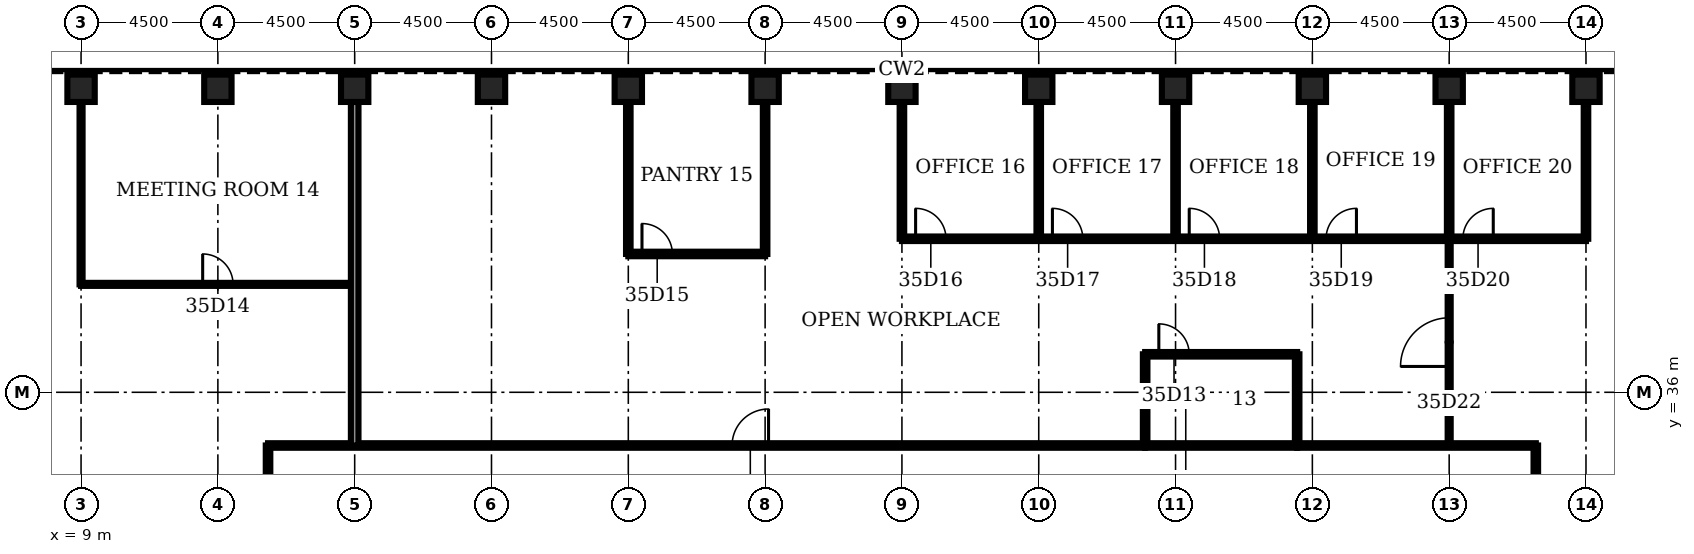
"""IFC4 building model, lengths in metres.
Left out: names, types, materials, properties, quantities, classifications, styles, units other than length and angle.
Written with IfcOpenShell. Run it as: python <this file> out.ifc"""

import sys

from ifc_helpers import new_model, si_unit, direction, frame, frame_2d, origin, origin_2d, place, context, subcontext, project, spatial, rectangle, hollow_rectangle, extrude, element, fill, save


model = new_model("IFC4")
c1 = context("Model", 3, precision=1e-05, world=origin(), true_north=direction((0.0, 1.0)))
c2 = subcontext(c1, "Body", "Model", "MODEL_VIEW")
j1 = project(units=[si_unit("LENGTHUNIT", "METRE"), si_unit("PLANEANGLEUNIT", "RADIAN")], contexts=[c1])
p1 = place(None, origin())
s1 = spatial("IfcSite", under=j1, at=p1, CompositionType="ELEMENT")
p2 = place(p1, origin())
s2 = spatial("IfcBuilding", under=s1, at=p2, CompositionType="ELEMENT")
p3 = place(p2, frame((0.0, 0.0, 159.3)))
s3 = spatial("IfcBuildingStorey", under=s2, at=p3, CompositionType="ELEMENT", Elevation=159.3)
for number, where, z_axis, x_axis in (
    (1, (58.5, 46.0, 0.0), (0.0, 0.0, 1.0), (0.0, 1.0, 0.0)),
    (2, (54.0, 46.0, 0.0), (0.0, 0.0, 1.0), (0.0, 1.0, 0.0)),
    (3, (49.5, 46.0, 0.0), (0.0, 0.0, 1.0), (0.0, 1.0, 0.0)),
    (4, (45.0, 46.0, 0.0), (0.0, 0.0, 1.0), (0.0, 1.0, 0.0)),
    (5, (40.5, 46.0, 0.0), (0.0, 0.0, 1.0), (0.0, 1.0, 0.0)),
    (6, (36.0, 46.0, 0.0), (0.0, 0.0, 1.0), (0.0, 1.0, 0.0)),
    (7, (31.5, 46.0, 0.0), (0.0, 0.0, 1.0), (0.0, 1.0, 0.0)),
    (8, (27.0, 46.0, 0.0), (0.0, 0.0, 1.0), (0.0, 1.0, 0.0)),
    (9, (22.5, 46.0, 0.0), (0.0, 0.0, 1.0), (0.0, 1.0, 0.0)),
    (10, (18.0, 46.0, 0.0), (0.0, 0.0, 1.0), (0.0, 1.0, 0.0)),
    (11, (13.5, 46.0, 0.0), (0.0, 0.0, 1.0), (0.0, 1.0, 0.0)),
    (12, (9.0, 46.0, 0.0), (0.0, 0.0, 1.0), (0.0, 1.0, 0.0)),
):
    element("IfcColumn", number, at=place(p3, frame(where, z_axis=z_axis, x_axis=x_axis)), inside=s3, PredefinedType="COLUMN", context=c2, shape_type="SweptSolid", body=[
        extrude(hollow_rectangle(XDim=0.9, YDim=0.9, WallThickness=0.1, at=origin_2d()), origin(), (0.0, 0.0, 1.0), 4.2),
    ])
p4 = place(p3, frame((15.15, 34.25, 0.0), z_axis=(0.0, 0.0, 1.0), x_axis=(1.0, 0.0, 0.0)))
e13 = element("IfcWall", 13, at=p4, inside=s3, PredefinedType="PARTITIONING", context=c2, shape_type="SweptSolid", body=[
    extrude(rectangle(XDim=28.85, YDim=0.15, at=frame_2d((14.425, 0.0))), origin(), (0.0, 0.0, 1.0), 3.0),
])
p5 = place(p4, frame((15.263, 0.0, 0.0)))
e14 = element("IfcOpeningElement", 14, at=p5, cuts=e13, PredefinedType="OPENING", context=c2, shape_type="SweptSolid", body=[
    extrude(rectangle(XDim=1.2, YDim=2.1, at=frame_2d((0.6, 1.05))), frame((0.0, 0.085, 0.0), z_axis=(0.0, -1.0, 0.0), x_axis=(1.0, 0.0, 0.0)), (0.0, 0.0, 1.0), 0.17),
])
p6 = place(p3, frame((44.0, 34.25, 0.0), z_axis=(0.0, 0.0, 1.0), x_axis=(1.0, 0.0, 0.0)))
e15 = element("IfcWall", 15, at=p6, inside=s3, PredefinedType="PARTITIONING", context=c2, shape_type="SweptSolid", body=[
    extrude(rectangle(XDim=5.0, YDim=0.15, at=frame_2d((2.5, 0.0))), origin(), (0.0, 0.0, 1.0), 3.0),
])
p7 = place(p3, frame((49.0, 34.25, 0.0), z_axis=(0.0, 0.0, 1.0), x_axis=(1.0, 0.0, 0.0)))
e16 = element("IfcWall", 16, at=p7, inside=s3, PredefinedType="PARTITIONING", context=c2, shape_type="SweptSolid", body=[
    extrude(rectangle(XDim=7.85, YDim=0.15, at=frame_2d((3.925, 0.0))), origin(), (0.0, 0.0, 1.0), 3.0),
])
p8 = place(p3, frame((44.0, 37.25, 0.0), z_axis=(0.0, 0.0, 1.0), x_axis=(1.0, 0.0, 0.0)))
e17 = element("IfcWall", 17, at=p8, inside=s3, PredefinedType="PARTITIONING", context=c2, shape_type="SweptSolid", body=[
    extrude(rectangle(XDim=5.0, YDim=0.15, at=frame_2d((2.5, 0.0))), origin(), (0.0, 0.0, 1.0), 3.0),
])
p9 = place(p8, frame((0.45, 0.0, 0.0)))
e18 = element("IfcOpeningElement", 18, at=p9, cuts=e17, PredefinedType="OPENING", context=c2, shape_type="SweptSolid", body=[
    extrude(rectangle(XDim=1.0, YDim=2.1, at=frame_2d((0.5, 1.05))), frame((0.0, 0.085, 0.0), z_axis=(0.0, -1.0, 0.0), x_axis=(1.0, 0.0, 0.0)), (0.0, 0.0, 1.0), 0.17),
])
p10 = place(p3, frame((9.0, 39.55, 0.0), z_axis=(0.0, 0.0, 1.0), x_axis=(1.0, 0.0, 0.0)))
e19 = element("IfcWall", 19, at=p10, inside=s3, PredefinedType="PARTITIONING", context=c2, shape_type="SweptSolid", body=[
    extrude(rectangle(XDim=9.0, YDim=0.1, at=frame_2d((4.5, 0.0))), origin(), (0.0, 0.0, 1.0), 3.0),
])
p11 = place(p10, frame((4.0, 0.0, 0.0)))
e20 = element("IfcOpeningElement", 20, at=p11, cuts=e19, PredefinedType="OPENING", context=c2, shape_type="SweptSolid", body=[
    extrude(rectangle(XDim=1.0, YDim=2.1, at=frame_2d((0.5, 1.05))), frame((0.0, 0.06, 0.0), z_axis=(0.0, -1.0, 0.0), x_axis=(1.0, 0.0, 0.0)), (0.0, 0.0, 1.0), 0.12),
])
p12 = place(p3, frame((27.0, 40.55, 0.0), z_axis=(0.0, 0.0, 1.0), x_axis=(1.0, 0.0, 0.0)))
e21 = element("IfcWall", 21, at=p12, inside=s3, PredefinedType="PARTITIONING", context=c2, shape_type="SweptSolid", body=[
    extrude(rectangle(XDim=4.5, YDim=0.15, at=frame_2d((2.25, 0.0))), origin(), (0.0, 0.0, 1.0), 3.0),
])
p13 = place(p12, frame((0.45, 0.0, 0.0)))
e22 = element("IfcOpeningElement", 22, at=p13, cuts=e21, PredefinedType="OPENING", context=c2, shape_type="SweptSolid", body=[
    extrude(rectangle(XDim=1.0, YDim=2.1, at=frame_2d((0.5, 1.05))), frame((0.0, 0.085, 0.0), z_axis=(0.0, -1.0, 0.0), x_axis=(1.0, 0.0, 0.0)), (0.0, 0.0, 1.0), 0.17),
])
p14 = place(p3, frame((36.0, 41.05, 0.0), z_axis=(0.0, 0.0, 1.0), x_axis=(1.0, 0.0, 0.0)))
e23 = element("IfcWall", 23, at=p14, inside=s3, PredefinedType="PARTITIONING", context=c2, shape_type="SweptSolid", body=[
    extrude(rectangle(XDim=22.5, YDim=0.15, at=frame_2d((11.25, 0.0))), origin(), (0.0, 0.0, 1.0), 3.0),
])
p15 = place(p14, frame((0.45, 0.0, 0.0)))
e24 = element("IfcOpeningElement", 24, at=p15, cuts=e23, PredefinedType="OPENING", context=c2, shape_type="SweptSolid", body=[
    extrude(rectangle(XDim=1.0, YDim=2.1, at=frame_2d((0.5, 1.05))), frame((0.0, 0.085, 0.0), z_axis=(0.0, -1.0, 0.0), x_axis=(1.0, 0.0, 0.0)), (0.0, 0.0, 1.0), 0.17),
])
p16 = place(p14, frame((4.95, 0.0, 0.0)))
e25 = element("IfcOpeningElement", 25, at=p16, cuts=e23, PredefinedType="OPENING", context=c2, shape_type="SweptSolid", body=[
    extrude(rectangle(XDim=1.0, YDim=2.1, at=frame_2d((0.5, 1.05))), frame((0.0, 0.085, 0.0), z_axis=(0.0, -1.0, 0.0), x_axis=(1.0, 0.0, 0.0)), (0.0, 0.0, 1.0), 0.17),
])
p17 = place(p14, frame((9.45, 0.0, 0.0)))
e26 = element("IfcOpeningElement", 26, at=p17, cuts=e23, PredefinedType="OPENING", context=c2, shape_type="SweptSolid", body=[
    extrude(rectangle(XDim=1.0, YDim=2.1, at=frame_2d((0.5, 1.05))), frame((0.0, 0.085, 0.0), z_axis=(0.0, -1.0, 0.0), x_axis=(1.0, 0.0, 0.0)), (0.0, 0.0, 1.0), 0.17),
])
p18 = place(p14, frame((13.95, 0.0, 0.0)))
e27 = element("IfcOpeningElement", 27, at=p18, cuts=e23, PredefinedType="OPENING", context=c2, shape_type="SweptSolid", body=[
    extrude(rectangle(XDim=1.0, YDim=2.1, at=frame_2d((0.5, 1.05))), frame((0.0, 0.085, 0.0), z_axis=(0.0, -1.0, 0.0), x_axis=(1.0, 0.0, 0.0)), (0.0, 0.0, 1.0), 0.17),
])
p19 = place(p14, frame((18.45, 0.0, 0.0)))
e28 = element("IfcOpeningElement", 28, at=p19, cuts=e23, PredefinedType="OPENING", context=c2, shape_type="SweptSolid", body=[
    extrude(rectangle(XDim=1.0, YDim=2.1, at=frame_2d((0.5, 1.05))), frame((0.0, 0.085, 0.0), z_axis=(0.0, -1.0, 0.0), x_axis=(1.0, 0.0, 0.0)), (0.0, 0.0, 1.0), 0.17),
])
p20 = place(p3, frame((9.0, 39.55, 0.0), z_axis=(0.0, 0.0, 1.0), x_axis=(0.0, 1.0, 0.0)))
e29 = element("IfcWall", 29, at=p20, inside=s3, PredefinedType="PARTITIONING", context=c2, shape_type="SweptSolid", body=[
    extrude(rectangle(XDim=6.0, YDim=0.1, at=frame_2d((3.0, 0.0))), origin(), (0.0, 0.0, 1.0), 3.0),
])
p21 = place(p3, frame((15.15, 13.75, 0.0), z_axis=(0.0, 0.0, 1.0), x_axis=(0.0, 1.0, 0.0)))
e30 = element("IfcWall", 30, at=p21, inside=s3, PredefinedType="PARTITIONING", context=c2, shape_type="SweptSolid", body=[
    extrude(rectangle(XDim=20.5, YDim=0.15, at=frame_2d((10.25, 0.0))), origin(), (0.0, 0.0, 1.0), 3.0),
])
p22 = place(p21, frame((9.65, 0.0, 0.0)))
e31 = element("IfcOpeningElement", 31, at=p22, cuts=e30, PredefinedType="OPENING", context=c2, shape_type="SweptSolid", body=[
    extrude(rectangle(XDim=1.2, YDim=2.1, at=frame_2d((0.6, 1.05))), frame((0.0, 0.085, 0.0), z_axis=(0.0, -1.0, 0.0), x_axis=(1.0, 0.0, 0.0)), (0.0, 0.0, 1.0), 0.17),
])
p23 = place(p3, frame((18.0, 34.25, 0.0), z_axis=(0.0, 0.0, 1.0), x_axis=(0.0, 1.0, 0.0)))
e32 = element("IfcWall", 32, at=p23, inside=s3, PredefinedType="PARTITIONING", context=c2, shape_type="SweptSolid", body=[
    extrude(rectangle(XDim=11.3, YDim=0.25, at=frame_2d((5.65, 0.0))), origin(), (0.0, 0.0, 1.0), 3.0),
])
for number, where, z_axis, x_axis in (
    (33, (27.0, 40.55, 0.0), (0.0, 0.0, 1.0), (0.0, 1.0, 0.0)),
    (34, (31.5, 40.55, 0.0), (0.0, 0.0, 1.0), (0.0, 1.0, 0.0)),
):
    element("IfcWall", number, at=place(p3, frame(where, z_axis=z_axis, x_axis=x_axis)), inside=s3, PredefinedType="PARTITIONING", context=c2, shape_type="SweptSolid", body=[
        extrude(rectangle(XDim=5.0, YDim=0.15, at=frame_2d((2.5, 0.0))), origin(), (0.0, 0.0, 1.0), 3.0),
    ])
for number, where, z_axis, x_axis in (
    (35, (36.0, 41.05, 0.0), (0.0, 0.0, 1.0), (0.0, 1.0, 0.0)),
    (36, (40.5, 41.05, 0.0), (0.0, 0.0, 1.0), (0.0, 1.0, 0.0)),
):
    element("IfcWall", number, at=place(p3, frame(where, z_axis=z_axis, x_axis=x_axis)), inside=s3, PredefinedType="PARTITIONING", context=c2, shape_type="SweptSolid", body=[
        extrude(rectangle(XDim=4.5, YDim=0.15, at=frame_2d((2.25, 0.0))), origin(), (0.0, 0.0, 1.0), 3.0),
    ])
p24 = place(p3, frame((44.0, 34.25, 0.0), z_axis=(0.0, 0.0, 1.0), x_axis=(0.0, 1.0, 0.0)))
e37 = element("IfcWall", 37, at=p24, inside=s3, PredefinedType="PARTITIONING", context=c2, shape_type="SweptSolid", body=[
    extrude(rectangle(XDim=3.0, YDim=0.15, at=frame_2d((1.5, 0.0))), origin(), (0.0, 0.0, 1.0), 3.0),
])
p25 = place(p3, frame((45.0, 41.05, 0.0), z_axis=(0.0, 0.0, 1.0), x_axis=(0.0, 1.0, 0.0)))
e38 = element("IfcWall", 38, at=p25, inside=s3, PredefinedType="PARTITIONING", context=c2, shape_type="SweptSolid", body=[
    extrude(rectangle(XDim=4.5, YDim=0.15, at=frame_2d((2.25, 0.0))), origin(), (0.0, 0.0, 1.0), 3.0),
])
p26 = place(p3, frame((49.0, 34.25, 0.0), z_axis=(0.0, 0.0, 1.0), x_axis=(0.0, 1.0, 0.0)))
e39 = element("IfcWall", 39, at=p26, inside=s3, PredefinedType="PARTITIONING", context=c2, shape_type="SweptSolid", body=[
    extrude(rectangle(XDim=3.0, YDim=0.15, at=frame_2d((1.5, 0.0))), origin(), (0.0, 0.0, 1.0), 3.0),
])
p27 = place(p3, frame((49.5, 41.05, 0.0), z_axis=(0.0, 0.0, 1.0), x_axis=(0.0, 1.0, 0.0)))
e40 = element("IfcWall", 40, at=p27, inside=s3, PredefinedType="PARTITIONING", context=c2, shape_type="SweptSolid", body=[
    extrude(rectangle(XDim=4.5, YDim=0.15, at=frame_2d((2.25, 0.0))), origin(), (0.0, 0.0, 1.0), 3.0),
])
p28 = place(p3, frame((54.0, 34.25, 0.0), z_axis=(0.0, 0.0, 1.0), x_axis=(0.0, 1.0, 0.0)))
e41 = element("IfcWall", 41, at=p28, inside=s3, PredefinedType="PARTITIONING", context=c2, shape_type="SweptSolid", body=[
    extrude(rectangle(XDim=6.8, YDim=0.1, at=frame_2d((3.4, 0.0))), origin(), (0.0, 0.0, 1.0), 3.0),
])
p29 = place(p28, frame((2.6, 0.0, 0.0)))
e42 = element("IfcOpeningElement", 42, at=p29, cuts=e41, PredefinedType="OPENING", context=c2, shape_type="SweptSolid", body=[
    extrude(rectangle(XDim=1.6, YDim=2.1, at=frame_2d((0.8, 1.05))), frame((0.0, 0.06, 0.0), z_axis=(0.0, -1.0, 0.0), x_axis=(1.0, 0.0, 0.0)), (0.0, 0.0, 1.0), 0.12),
])
p30 = place(p3, frame((54.0, 41.05, 0.0), z_axis=(0.0, 0.0, 1.0), x_axis=(0.0, 1.0, 0.0)))
e43 = element("IfcWall", 43, at=p30, inside=s3, PredefinedType="PARTITIONING", context=c2, shape_type="SweptSolid", body=[
    extrude(rectangle(XDim=4.5, YDim=0.15, at=frame_2d((2.25, 0.0))), origin(), (0.0, 0.0, 1.0), 3.0),
])
p31 = place(p3, frame((56.85, 13.75, 0.0), z_axis=(0.0, 0.0, 1.0), x_axis=(0.0, 1.0, 0.0)))
e44 = element("IfcWall", 44, at=p31, inside=s3, PredefinedType="PARTITIONING", context=c2, shape_type="SweptSolid", body=[
    extrude(rectangle(XDim=20.5, YDim=0.15, at=frame_2d((10.25, 0.0))), origin(), (0.0, 0.0, 1.0), 3.0),
])
p32 = place(p31, frame((9.65, 0.0, 0.0)))
e45 = element("IfcOpeningElement", 45, at=p32, cuts=e44, PredefinedType="OPENING", context=c2, shape_type="SweptSolid", body=[
    extrude(rectangle(XDim=1.2, YDim=2.1, at=frame_2d((0.6, 1.05))), frame((0.0, 0.085, 0.0), z_axis=(0.0, -1.0, 0.0), x_axis=(1.0, 0.0, 0.0)), (0.0, 0.0, 1.0), 0.17),
])
p33 = place(p3, frame((58.5, 41.05, 0.0), z_axis=(0.0, 0.0, 1.0), x_axis=(0.0, 1.0, 0.0)))
e46 = element("IfcWall", 46, at=p33, inside=s3, PredefinedType="PARTITIONING", context=c2, shape_type="SweptSolid", body=[
    extrude(rectangle(XDim=4.5, YDim=0.15, at=frame_2d((2.25, 0.0))), origin(), (0.0, 0.0, 1.0), 3.0),
])
p34 = place(p9, origin())
e47 = element("IfcDoor", 47, at=p34, inside=s3, OperationType="SINGLE_SWING_LEFT", PredefinedType="DOOR", context=c2, shape_type="SweptSolid", body=[
    extrude(rectangle(XDim=1.0, YDim=2.1, at=frame_2d((0.5, 1.05))), frame((0.0, 0.025, 0.0), z_axis=(0.0, -1.0, 0.0), x_axis=(1.0, 0.0, 0.0)), (0.0, 0.0, 1.0), 0.05),
])
fill(e18, e47)
p35 = place(p11, origin())
e48 = element("IfcDoor", 48, at=p35, inside=s3, OperationType="SINGLE_SWING_LEFT", PredefinedType="DOOR", context=c2, shape_type="SweptSolid", body=[
    extrude(rectangle(XDim=1.0, YDim=2.1, at=frame_2d((0.5, 1.05))), frame((0.0, 0.025, 0.0), z_axis=(0.0, -1.0, 0.0), x_axis=(1.0, 0.0, 0.0)), (0.0, 0.0, 1.0), 0.05),
])
fill(e20, e48)
p36 = place(p13, origin())
e49 = element("IfcDoor", 49, at=p36, inside=s3, OperationType="SINGLE_SWING_LEFT", PredefinedType="DOOR", context=c2, shape_type="SweptSolid", body=[
    extrude(rectangle(XDim=1.0, YDim=2.1, at=frame_2d((0.5, 1.05))), frame((0.0, 0.025, 0.0), z_axis=(0.0, -1.0, 0.0), x_axis=(1.0, 0.0, 0.0)), (0.0, 0.0, 1.0), 0.05),
])
fill(e22, e49)
p37 = place(p15, origin())
e50 = element("IfcDoor", 50, at=p37, inside=s3, OperationType="SINGLE_SWING_LEFT", PredefinedType="DOOR", context=c2, shape_type="SweptSolid", body=[
    extrude(rectangle(XDim=1.0, YDim=2.1, at=frame_2d((0.5, 1.05))), frame((0.0, 0.025, 0.0), z_axis=(0.0, -1.0, 0.0), x_axis=(1.0, 0.0, 0.0)), (0.0, 0.0, 1.0), 0.05),
])
fill(e24, e50)
p38 = place(p16, origin())
e51 = element("IfcDoor", 51, at=p38, inside=s3, OperationType="SINGLE_SWING_LEFT", PredefinedType="DOOR", context=c2, shape_type="SweptSolid", body=[
    extrude(rectangle(XDim=1.0, YDim=2.1, at=frame_2d((0.5, 1.05))), frame((0.0, 0.025, 0.0), z_axis=(0.0, -1.0, 0.0), x_axis=(1.0, 0.0, 0.0)), (0.0, 0.0, 1.0), 0.05),
])
fill(e25, e51)
p39 = place(p17, origin())
e52 = element("IfcDoor", 52, at=p39, inside=s3, OperationType="SINGLE_SWING_LEFT", PredefinedType="DOOR", context=c2, shape_type="SweptSolid", body=[
    extrude(rectangle(XDim=1.0, YDim=2.1, at=frame_2d((0.5, 1.05))), frame((0.0, 0.025, 0.0), z_axis=(0.0, -1.0, 0.0), x_axis=(1.0, 0.0, 0.0)), (0.0, 0.0, 1.0), 0.05),
])
fill(e26, e52)
p40 = place(p18, origin())
e53 = element("IfcDoor", 53, at=p40, inside=s3, OperationType="SINGLE_SWING_RIGHT", PredefinedType="DOOR", context=c2, shape_type="SweptSolid", body=[
    extrude(rectangle(XDim=1.0, YDim=2.1, at=frame_2d((0.5, 1.05))), frame((0.0, 0.025, 0.0), z_axis=(0.0, -1.0, 0.0), x_axis=(1.0, 0.0, 0.0)), (0.0, 0.0, 1.0), 0.05),
])
fill(e27, e53)
p41 = place(p19, origin())
e54 = element("IfcDoor", 54, at=p41, inside=s3, OperationType="SINGLE_SWING_RIGHT", PredefinedType="DOOR", context=c2, shape_type="SweptSolid", body=[
    extrude(rectangle(XDim=1.0, YDim=2.1, at=frame_2d((0.5, 1.05))), frame((0.0, 0.025, 0.0), z_axis=(0.0, -1.0, 0.0), x_axis=(1.0, 0.0, 0.0)), (0.0, 0.0, 1.0), 0.05),
])
fill(e28, e54)
p42 = place(p29, origin())
e55 = element("IfcDoor", 55, at=p42, inside=s3, OperationType="SINGLE_SWING_LEFT", PredefinedType="DOOR", context=c2, shape_type="SweptSolid", body=[
    extrude(rectangle(XDim=1.6, YDim=2.1, at=frame_2d((0.8, 1.05))), frame((0.0, 0.025, 0.0), z_axis=(0.0, -1.0, 0.0), x_axis=(1.0, 0.0, 0.0)), (0.0, 0.0, 1.0), 0.05),
])
fill(e42, e55)
p43 = place(p5, origin())
e56 = element("IfcDoor", 56, at=p43, inside=s3, OperationType="SINGLE_SWING_RIGHT", PredefinedType="DOOR", context=c2, shape_type="SweptSolid", body=[
    extrude(rectangle(XDim=1.2, YDim=2.1, at=frame_2d((0.6, 1.05))), frame((0.0, 0.025, 0.0), z_axis=(0.0, -1.0, 0.0), x_axis=(1.0, 0.0, 0.0)), (0.0, 0.0, 1.0), 0.05),
])
fill(e14, e56)
save(model, sys.argv[1])
